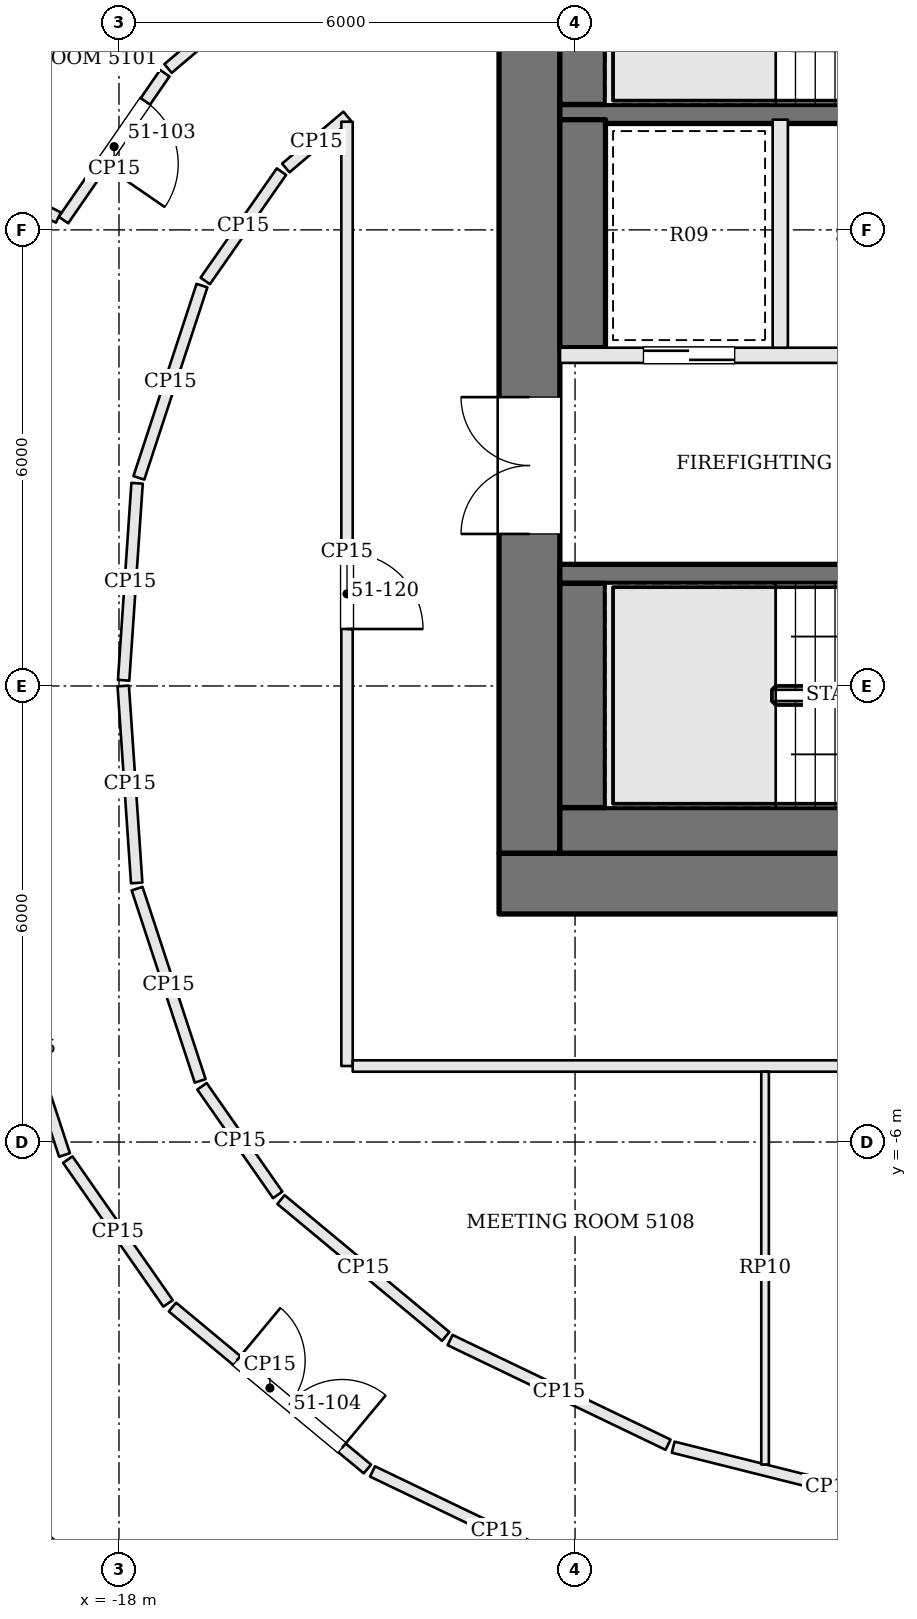
"""IFC4 building model, lengths in metres.
Left out: names, types, materials, properties, quantities, classifications, styles, units other than length and angle.
Written with IfcOpenShell. Run it as: python <this file> out.ifc"""

import sys

from ifc_helpers import new_model, si_unit, direction, frame, frame_2d, origin, place, context, subcontext, project, spatial, rectangle, extrude, element, fill, save


model = new_model("IFC4")
c1 = context("Model", 3, precision=1e-05, world=origin(), true_north=direction((0.0, 1.0)))
c2 = subcontext(c1, "Body", "Model", "MODEL_VIEW")
j1 = project(units=[si_unit("LENGTHUNIT", "METRE"), si_unit("PLANEANGLEUNIT", "RADIAN")], contexts=[c1])
p1 = place(None, origin())
s1 = spatial("IfcSite", under=j1, at=p1, CompositionType="ELEMENT")
p2 = place(p1, origin())
s2 = spatial("IfcBuilding", under=s1, at=p2, CompositionType="ELEMENT")
p3 = place(p2, frame((0.0, 0.0, 209.1)))
s3 = spatial("IfcBuildingStorey", under=s2, at=p3, CompositionType="ELEMENT", Elevation=209.1)
p4 = place(p3, frame((-13.0, -2.6, 0.0), z_axis=(0.0, 0.0, 1.0), x_axis=(1.0, 0.0, 0.0)))
e1 = element("IfcWall", 1, at=p4, inside=s3, PredefinedType="SHEAR", context=c2, shape_type="SweptSolid", body=[
    extrude(rectangle(XDim=26.0, YDim=0.8, at=frame_2d((13.0, 0.0))), origin(), (0.0, 0.0, 1.0), 3.9),
])
p5 = place(p4, frame((9.275, 0.0, 0.0)))
e2 = element("IfcOpeningElement", 2, at=p5, cuts=e1, PredefinedType="OPENING", context=c2, shape_type="SweptSolid", body=[
    extrude(rectangle(XDim=0.9, YDim=2.1, at=frame_2d((0.45, 1.05))), frame((0.0, 0.41, 0.0), z_axis=(0.0, -1.0, 0.0), x_axis=(1.0, 0.0, 0.0)), (0.0, 0.0, 1.0), 0.82),
])
p6 = place(p4, frame((11.75, 0.0, 0.0)))
e3 = element("IfcOpeningElement", 3, at=p6, cuts=e1, PredefinedType="OPENING", context=c2, shape_type="SweptSolid", body=[
    extrude(rectangle(XDim=1.0, YDim=2.1, at=frame_2d((0.5, 1.05))), frame((0.0, 0.41, 0.0), z_axis=(0.0, -1.0, 0.0), x_axis=(1.0, 0.0, 0.0)), (0.0, 0.0, 1.0), 0.82),
])
p7 = place(p4, frame((14.325, 0.0, 0.0)))
e4 = element("IfcOpeningElement", 4, at=p7, cuts=e1, PredefinedType="OPENING", context=c2, shape_type="SweptSolid", body=[
    extrude(rectangle(XDim=0.9, YDim=2.1, at=frame_2d((0.45, 1.05))), frame((0.0, 0.41, 0.0), z_axis=(0.0, -1.0, 0.0), x_axis=(1.0, 0.0, 0.0)), (0.0, 0.0, 1.0), 0.82),
])
p8 = place(p4, frame((16.7, 0.0, 0.0)))
e5 = element("IfcOpeningElement", 5, at=p8, cuts=e1, PredefinedType="OPENING", context=c2, shape_type="SweptSolid", body=[
    extrude(rectangle(XDim=0.9, YDim=2.1, at=frame_2d((0.45, 1.05))), frame((0.0, 0.41, 0.0), z_axis=(0.0, -1.0, 0.0), x_axis=(1.0, 0.0, 0.0)), (0.0, 0.0, 1.0), 0.82),
])
p9 = place(p3, frame((-12.6, -2.2, 0.0), z_axis=(0.0, 0.0, 1.0), x_axis=(0.0, 1.0, 0.0)))
e6 = element("IfcWall", 6, at=p9, inside=s3, PredefinedType="SHEAR", context=c2, shape_type="SweptSolid", body=[
    extrude(rectangle(XDim=13.4, YDim=0.8, at=frame_2d((6.7, 0.0))), origin(), (0.0, 0.0, 1.0), 3.9),
])
p10 = place(p9, frame((4.2, 0.0, 0.0)))
e7 = element("IfcOpeningElement", 7, at=p10, cuts=e6, PredefinedType="OPENING", context=c2, shape_type="SweptSolid", body=[
    extrude(rectangle(XDim=1.8, YDim=2.1, at=frame_2d((0.9, 1.05))), frame((0.0, 0.41, 0.0), z_axis=(0.0, -1.0, 0.0), x_axis=(1.0, 0.0, 0.0)), (0.0, 0.0, 1.0), 0.82),
])
p11 = place(p3, frame((-12.2, 1.475, 0.0), z_axis=(0.0, 0.0, 1.0), x_axis=(1.0, 0.0, 0.0)))
e8 = element("IfcWall", 8, at=p11, inside=s3, PredefinedType="SOLIDWALL", context=c2, shape_type="SweptSolid", body=[
    extrude(rectangle(XDim=7.1, YDim=0.25, at=frame_2d((3.55, 0.0))), origin(), (0.0, 0.0, 1.0), 3.7),
])
p12 = place(p11, frame((5.8, 0.0, 0.0)))
e9 = element("IfcOpeningElement", 9, at=p12, cuts=e8, PredefinedType="OPENING", context=c2, shape_type="SweptSolid", body=[
    extrude(rectangle(XDim=1.2, YDim=2.1, at=frame_2d((0.6, 1.05))), frame((0.0, 0.135, 0.0), z_axis=(0.0, -1.0, 0.0), x_axis=(1.0, 0.0, 0.0)), (0.0, 0.0, 1.0), 0.27),
])
p13 = place(p3, frame((-12.2, 4.35, 0.0), z_axis=(0.0, 0.0, 1.0), x_axis=(1.0, 0.0, 0.0)))
e10 = element("IfcWall", 10, at=p13, inside=s3, PredefinedType="SOLIDWALL", context=c2, shape_type="SweptSolid", body=[
    extrude(rectangle(XDim=7.1, YDim=0.2, at=frame_2d((3.55, 0.0))), origin(), (0.0, 0.0, 1.0), 3.7),
])
p14 = place(p13, frame((4.4, 0.0, 0.0)))
e11 = element("IfcOpeningElement", 11, at=p14, cuts=e10, PredefinedType="OPENING", context=c2, shape_type="SweptSolid", body=[
    extrude(rectangle(XDim=1.2, YDim=2.1, at=frame_2d((0.6, 1.05))), frame((0.0, 0.11, 0.0), z_axis=(0.0, -1.0, 0.0), x_axis=(1.0, 0.0, 0.0)), (0.0, 0.0, 1.0), 0.22),
])
p15 = place(p13, frame((1.1, 0.0, 0.0)))
e12 = element("IfcOpeningElement", 12, at=p15, cuts=e10, PredefinedType="OPENING", context=c2, shape_type="SweptSolid", body=[
    extrude(rectangle(XDim=1.2, YDim=2.1, at=frame_2d((0.6, 1.05))), frame((0.0, 0.11, 0.0), z_axis=(0.0, -1.0, 0.0), x_axis=(1.0, 0.0, 0.0)), (0.0, 0.0, 1.0), 0.22),
])
p16 = place(p3, frame((-12.2, 7.525, 0.0), z_axis=(0.0, 0.0, 1.0), x_axis=(1.0, 0.0, 0.0)))
e13 = element("IfcWall", 13, at=p16, inside=s3, PredefinedType="SOLIDWALL", context=c2, shape_type="SweptSolid", body=[
    extrude(rectangle(XDim=7.1, YDim=0.25, at=frame_2d((3.55, 0.0))), origin(), (0.0, 0.0, 1.0), 3.7),
])
p17 = place(p16, frame((5.8, 0.0, 0.0)))
e14 = element("IfcOpeningElement", 14, at=p17, cuts=e13, PredefinedType="OPENING", context=c2, shape_type="SweptSolid", body=[
    extrude(rectangle(XDim=1.2, YDim=2.1, at=frame_2d((0.6, 1.05))), frame((0.0, 0.135, 0.0), z_axis=(0.0, -1.0, 0.0), x_axis=(1.0, 0.0, 0.0)), (0.0, 0.0, 1.0), 0.27),
])
p18 = place(p3, frame((-9.3, 4.45, 0.0), z_axis=(0.0, 0.0, 1.0), x_axis=(0.0, 1.0, 0.0)))
e15 = element("IfcWall", 15, at=p18, inside=s3, PredefinedType="SOLIDWALL", context=c2, shape_type="SweptSolid", body=[
    extrude(rectangle(XDim=3.0, YDim=0.2, at=frame_2d((1.5, 0.0))), origin(), (0.0, 0.0, 1.0), 3.7),
])
p19 = place(p3, frame((-12.2, -1.9, 0.0), z_axis=(0.0, 0.0, 1.0), x_axis=(1.0, 0.0, 0.0)))
e16 = element("IfcWall", 16, at=p19, inside=s3, PredefinedType="SOLIDWALL", context=c2, shape_type="SweptSolid", body=[
    extrude(rectangle(XDim=7.1, YDim=0.6, at=frame_2d((3.55, 0.0))), origin(), (0.0, 0.0, 1.0), 3.7),
])
p20 = place(p3, frame((-11.9, -1.6, 0.0), z_axis=(0.0, 0.0, 1.0), x_axis=(0.0, 1.0, 0.0)))
e17 = element("IfcWall", 17, at=p20, inside=s3, PredefinedType="SOLIDWALL", context=c2, shape_type="SweptSolid", body=[
    extrude(rectangle(XDim=2.95, YDim=0.6, at=frame_2d((1.475, 0.0))), origin(), (0.0, 0.0, 1.0), 3.7),
])
p21 = place(p3, frame((-11.9, 4.45, 0.0), z_axis=(0.0, 0.0, 1.0), x_axis=(0.0, 1.0, 0.0)))
e18 = element("IfcWall", 18, at=p21, inside=s3, PredefinedType="SOLIDWALL", context=c2, shape_type="SweptSolid", body=[
    extrude(rectangle(XDim=3.0, YDim=0.6, at=frame_2d((1.5, 0.0))), origin(), (0.0, 0.0, 1.0), 3.7),
])
p22 = place(p3, frame((-11.9, 7.65, 0.0), z_axis=(0.0, 0.0, 1.0), x_axis=(0.0, 1.0, 0.0)))
e19 = element("IfcWall", 19, at=p22, inside=s3, PredefinedType="SOLIDWALL", context=c2, shape_type="SweptSolid", body=[
    extrude(rectangle(XDim=2.95, YDim=0.6, at=frame_2d((1.475, 0.0))), origin(), (0.0, 0.0, 1.0), 3.7),
])
p23 = place(p3, frame((-15.057, 10.073, 0.0), z_axis=(0.0, 0.0, 1.0), x_axis=(-0.762398905861, -0.647107339119, 0.0)))
e20 = element("IfcWall", 20, at=p23, inside=s3, PredefinedType="PARTITIONING", context=c2, shape_type="SweptSolid", body=[
    extrude(rectangle(XDim=3.013, YDim=0.15, at=frame_2d((1.507, 0.0))), origin(), (0.0, 0.0, 1.0), 3.084),
])
p24 = place(p3, frame((-17.397, 8.061, 0.0), z_axis=(0.0, 0.0, 1.0), x_axis=(-0.567954177421, -0.823060175413, 0.0)))
e21 = element("IfcWall", 21, at=p24, inside=s3, PredefinedType="PARTITIONING", context=c2, shape_type="SweptSolid", body=[
    extrude(rectangle(XDim=2.347, YDim=0.15, at=frame_2d((1.173, 0.0))), origin(), (0.0, 0.0, 1.0), 3.084),
])
p25 = place(p24, frame((0.45, 0.0, 0.0)))
e22 = element("IfcOpeningElement", 22, at=p25, cuts=e21, PredefinedType="OPENING", context=c2, shape_type="SweptSolid", body=[
    extrude(rectangle(XDim=1.0, YDim=2.4, at=frame_2d((0.5, 1.2))), frame((0.0, 0.085, 0.0), z_axis=(0.0, -1.0, 0.0), x_axis=(1.0, 0.0, 0.0)), (0.0, 0.0, 1.0), 0.17),
])
p26 = place(p3, frame((-21.045, 7.266, 0.0), z_axis=(0.0, 0.0, 1.0), x_axis=(0.897699172042, -0.440608892915, 0.0)))
e23 = element("IfcWall", 23, at=p26, inside=s3, PredefinedType="PARTITIONING", context=c2, shape_type="SweptSolid", body=[
    extrude(rectangle(XDim=2.503, YDim=0.15, at=frame_2d((1.252, 0.0))), origin(), (0.0, 0.0, 1.0), 3.084),
])
p27 = place(p3, frame((-19.637, -3.366, 0.0), z_axis=(0.0, 0.0, 1.0), x_axis=(0.311881277787, -0.950121081003, 0.0)))
e24 = element("IfcWall", 24, at=p27, inside=s3, PredefinedType="PARTITIONING", context=c2, shape_type="SweptSolid", body=[
    extrude(rectangle(XDim=2.951, YDim=0.15, at=frame_2d((1.476, 0.0))), origin(), (0.0, 0.0, 1.0), 3.084),
])
p28 = place(p3, frame((-18.674, -6.232, 0.0), z_axis=(0.0, 0.0, 1.0), x_axis=(0.572118665737, -0.820170855563, 0.0)))
e25 = element("IfcWall", 25, at=p28, inside=s3, PredefinedType="PARTITIONING", context=c2, shape_type="SweptSolid", body=[
    extrude(rectangle(XDim=2.306, YDim=0.15, at=frame_2d((1.153, 0.0))), origin(), (0.0, 0.0, 1.0), 3.084),
])
p29 = place(p3, frame((-17.297, -8.171, 0.0), z_axis=(0.0, 0.0, 1.0), x_axis=(0.769228575061, -0.638973707839, 0.0)))
e26 = element("IfcWall", 26, at=p29, inside=s3, PredefinedType="PARTITIONING", context=c2, shape_type="SweptSolid", body=[
    extrude(rectangle(XDim=3.334, YDim=0.15, at=frame_2d((1.667, 0.0))), origin(), (0.0, 0.0, 1.0), 3.084),
])
p30 = place(p29, frame((1.1, 0.0, 0.0)))
e27 = element("IfcOpeningElement", 27, at=p30, cuts=e26, PredefinedType="OPENING", context=c2, shape_type="SweptSolid", body=[
    extrude(rectangle(XDim=1.8, YDim=2.1, at=frame_2d((0.9, 1.05))), frame((0.0, 0.085, 0.0), z_axis=(0.0, -1.0, 0.0), x_axis=(1.0, 0.0, 0.0)), (0.0, 0.0, 1.0), 0.17),
])
p31 = place(p3, frame((-14.664, -10.334, 0.0), z_axis=(0.0, 0.0, 1.0), x_axis=(0.901507315282, -0.432763862278, 0.0)))
e28 = element("IfcWall", 28, at=p31, inside=s3, PredefinedType="PARTITIONING", context=c2, shape_type="SweptSolid", body=[
    extrude(rectangle(XDim=3.63, YDim=0.15, at=frame_2d((1.815, 0.0))), origin(), (0.0, 0.0, 1.0), 3.084),
])
p32 = place(p3, frame((-6.553, -11.056, 0.0), z_axis=(0.0, 0.0, 1.0), x_axis=(-0.970004917182, 0.243085294995, 0.0)))
e29 = element("IfcWall", 29, at=p32, inside=s3, PredefinedType="PARTITIONING", context=c2, shape_type="SweptSolid", body=[
    extrude(rectangle(XDim=4.284, YDim=0.15, at=frame_2d((2.142, 0.0))), origin(), (0.0, 0.0, 1.0), 3.084),
])
p33 = place(p3, frame((-10.776, -9.982, 0.0), z_axis=(0.0, 0.0, 1.0), x_axis=(-0.901511079436, 0.432756020933, 0.0)))
e30 = element("IfcWall", 30, at=p33, inside=s3, PredefinedType="PARTITIONING", context=c2, shape_type="SweptSolid", body=[
    extrude(rectangle(XDim=3.181, YDim=0.15, at=frame_2d((1.59, 0.0))), origin(), (0.0, 0.0, 1.0), 3.084),
])
p34 = place(p3, frame((-13.702, -8.557, 0.0), z_axis=(0.0, 0.0, 1.0), x_axis=(-0.769221825067, 0.638981833733, 0.0)))
e31 = element("IfcWall", 31, at=p34, inside=s3, PredefinedType="PARTITIONING", context=c2, shape_type="SweptSolid", body=[
    extrude(rectangle(XDim=2.817, YDim=0.15, at=frame_2d((1.409, 0.0))), origin(), (0.0, 0.0, 1.0), 3.084),
])
p35 = place(p3, frame((-15.912, -6.696, 0.0), z_axis=(0.0, 0.0, 1.0), x_axis=(-0.572078533763, 0.820198848578, 0.0)))
e32 = element("IfcWall", 32, at=p35, inside=s3, PredefinedType="PARTITIONING", context=c2, shape_type="SweptSolid", body=[
    extrude(rectangle(XDim=1.742, YDim=0.15, at=frame_2d((0.871, 0.0))), origin(), (0.0, 0.0, 1.0), 3.084),
])
p36 = place(p3, frame((-16.932, -5.196, 0.0), z_axis=(0.0, 0.0, 1.0), x_axis=(-0.311904957484, 0.950113307715, 0.0)))
e33 = element("IfcWall", 33, at=p36, inside=s3, PredefinedType="PARTITIONING", context=c2, shape_type="SweptSolid", body=[
    extrude(rectangle(XDim=2.662, YDim=0.15, at=frame_2d((1.331, 0.0))), origin(), (0.0, 0.0, 1.0), 3.084),
])
p37 = place(p3, frame((-17.767, -2.592, 0.0), z_axis=(0.0, 0.0, 1.0), x_axis=(-0.068140828228, 0.997675712608, 0.0)))
e34 = element("IfcWall", 34, at=p37, inside=s3, PredefinedType="PARTITIONING", context=c2, shape_type="SweptSolid", body=[
    extrude(rectangle(XDim=2.598, YDim=0.15, at=frame_2d((1.299, 0.0))), origin(), (0.0, 0.0, 1.0), 3.084),
])
p38 = place(p3, frame((-17.939, 0.075, 0.0), z_axis=(0.0, 0.0, 1.0), x_axis=(0.068227980697, 0.997669756307, 0.0)))
e35 = element("IfcWall", 35, at=p38, inside=s3, PredefinedType="PARTITIONING", context=c2, shape_type="SweptSolid", body=[
    extrude(rectangle(XDim=2.598, YDim=0.15, at=frame_2d((1.299, 0.0))), origin(), (0.0, 0.0, 1.0), 3.084),
])
p39 = place(p3, frame((-17.739, 2.738, 0.0), z_axis=(0.0, 0.0, 1.0), x_axis=(0.311904957484, 0.950113307715, 0.0)))
e36 = element("IfcWall", 36, at=p39, inside=s3, PredefinedType="PARTITIONING", context=c2, shape_type="SweptSolid", body=[
    extrude(rectangle(XDim=2.662, YDim=0.15, at=frame_2d((1.331, 0.0))), origin(), (0.0, 0.0, 1.0), 3.084),
])
p40 = place(p3, frame((-16.865, 5.329, 0.0), z_axis=(0.0, 0.0, 1.0), x_axis=(0.572096615639, 0.820186236397, 0.0)))
e37 = element("IfcWall", 37, at=p40, inside=s3, PredefinedType="PARTITIONING", context=c2, shape_type="SweptSolid", body=[
    extrude(rectangle(XDim=1.753, YDim=0.15, at=frame_2d((0.876, 0.0))), origin(), (0.0, 0.0, 1.0), 3.084),
])
p41 = place(p3, frame((-15.805, 6.814, 0.0), z_axis=(0.0, 0.0, 1.0), x_axis=(0.762298381233, 0.647225755027, 0.0)))
e38 = element("IfcWall", 38, at=p41, inside=s3, PredefinedType="PARTITIONING", context=c2, shape_type="SweptSolid", body=[
    extrude(rectangle(XDim=1.057, YDim=0.15, at=frame_2d((0.528, 0.0))), origin(), (0.0, 0.0, 1.0), 3.084),
])
p42 = place(p3, frame((-15.0, 7.423, 0.0), z_axis=(0.0, 0.0, 1.0), x_axis=(0.0, -1.0, 0.0)))
e39 = element("IfcWall", 39, at=p42, inside=s3, PredefinedType="PARTITIONING", context=c2, shape_type="SweptSolid", body=[
    extrude(rectangle(XDim=12.423, YDim=0.15, at=frame_2d((6.211, 0.0))), origin(), (0.0, 0.0, 1.0), 3.084),
])
p43 = place(p42, frame((5.674, 0.0, 0.0)))
e40 = element("IfcOpeningElement", 40, at=p43, cuts=e39, PredefinedType="OPENING", context=c2, shape_type="SweptSolid", body=[
    extrude(rectangle(XDim=1.0, YDim=2.4, at=frame_2d((0.5, 1.2))), frame((0.0, 0.085, 0.0), z_axis=(0.0, -1.0, 0.0), x_axis=(1.0, 0.0, 0.0)), (0.0, 0.0, 1.0), 0.17),
])
p44 = place(p3, frame((-14.925, -5.0, 0.0), z_axis=(0.0, 0.0, 1.0), x_axis=(1.0, 0.0, 0.0)))
e41 = element("IfcWall", 41, at=p44, inside=s3, PredefinedType="PARTITIONING", context=c2, shape_type="SweptSolid", body=[
    extrude(rectangle(XDim=29.925, YDim=0.15, at=frame_2d((14.962, 0.0))), origin(), (0.0, 0.0, 1.0), 3.084),
])
p45 = place(p44, frame((14.025, 0.0, 0.0)))
e42 = element("IfcOpeningElement", 42, at=p45, cuts=e41, PredefinedType="OPENING", context=c2, shape_type="SweptSolid", body=[
    extrude(rectangle(XDim=1.8, YDim=2.1, at=frame_2d((0.9, 1.05))), frame((0.0, 0.085, 0.0), z_axis=(0.0, -1.0, 0.0), x_axis=(1.0, 0.0, 0.0)), (0.0, 0.0, 1.0), 0.17),
])
p46 = place(p3, frame((-16.62, -13.153, 0.0), z_axis=(0.0, 0.0, 1.0), x_axis=(-0.76922129881, 0.638982467253, 0.0)))
e43 = element("IfcWall", 43, at=p46, inside=s3, PredefinedType="PARTITIONING", context=c2, shape_type="SweptSolid", body=[
    extrude(rectangle(XDim=4.238, YDim=0.1, at=frame_2d((2.119, 0.0))), origin(), (0.0, 0.0, 1.0), 3.084),
])
p47 = place(p3, frame((-9.5, -10.242, 0.0), z_axis=(0.0, 0.0, 1.0), x_axis=(0.0, 1.0, 0.0)))
e44 = element("IfcWall", 44, at=p47, inside=s3, PredefinedType="PARTITIONING", context=c2, shape_type="SweptSolid", body=[
    extrude(rectangle(XDim=5.167, YDim=0.1, at=frame_2d((2.583, 0.0))), origin(), (0.0, 0.0, 1.0), 3.084),
])
p48 = place(p10, origin())
e45 = element("IfcDoor", 45, at=p48, inside=s3, OperationType="DOUBLE_DOOR_SINGLE_SWING", PredefinedType="DOOR", context=c2, shape_type="SweptSolid", body=[
    extrude(rectangle(XDim=1.8, YDim=2.1, at=frame_2d((0.9, 1.05))), frame((0.0, 0.025, 0.0), z_axis=(0.0, -1.0, 0.0), x_axis=(1.0, 0.0, 0.0)), (0.0, 0.0, 1.0), 0.05),
])
fill(e7, e45)
p49 = place(p15, origin())
e46 = element("IfcDoor", 46, at=p49, inside=s3, OperationType="SLIDING_TO_RIGHT", PredefinedType="DOOR", context=c2, shape_type="SweptSolid", body=[
    extrude(rectangle(XDim=1.2, YDim=2.1, at=frame_2d((0.6, 1.05))), frame((0.0, 0.025, 0.0), z_axis=(0.0, -1.0, 0.0), x_axis=(1.0, 0.0, 0.0)), (0.0, 0.0, 1.0), 0.05),
])
fill(e12, e46)
p50 = place(p25, origin())
e47 = element("IfcDoor", 47, at=p50, inside=s3, OperationType="SINGLE_SWING_RIGHT", PredefinedType="DOOR", context=c2, shape_type="SweptSolid", body=[
    extrude(rectangle(XDim=1.0, YDim=2.4, at=frame_2d((0.5, 1.2))), frame((0.0, 0.025, 0.0), z_axis=(0.0, -1.0, 0.0), x_axis=(1.0, 0.0, 0.0)), (0.0, 0.0, 1.0), 0.05),
])
fill(e22, e47)
p51 = place(p30, origin())
e48 = element("IfcDoor", 48, at=p51, inside=s3, OperationType="DOUBLE_DOOR_SINGLE_SWING", PredefinedType="DOOR", context=c2, shape_type="SweptSolid", body=[
    extrude(rectangle(XDim=1.8, YDim=2.1, at=frame_2d((0.9, 1.05))), frame((0.0, 0.025, 0.0), z_axis=(0.0, -1.0, 0.0), x_axis=(1.0, 0.0, 0.0)), (0.0, 0.0, 1.0), 0.05),
])
fill(e27, e48)
p52 = place(p43, origin())
e49 = element("IfcDoor", 49, at=p52, inside=s3, OperationType="SINGLE_SWING_RIGHT", PredefinedType="DOOR", context=c2, shape_type="SweptSolid", body=[
    extrude(rectangle(XDim=1.0, YDim=2.4, at=frame_2d((0.5, 1.2))), frame((0.0, 0.025, 0.0), z_axis=(0.0, -1.0, 0.0), x_axis=(1.0, 0.0, 0.0)), (0.0, 0.0, 1.0), 0.05),
])
fill(e40, e49)
save(model, sys.argv[1])
